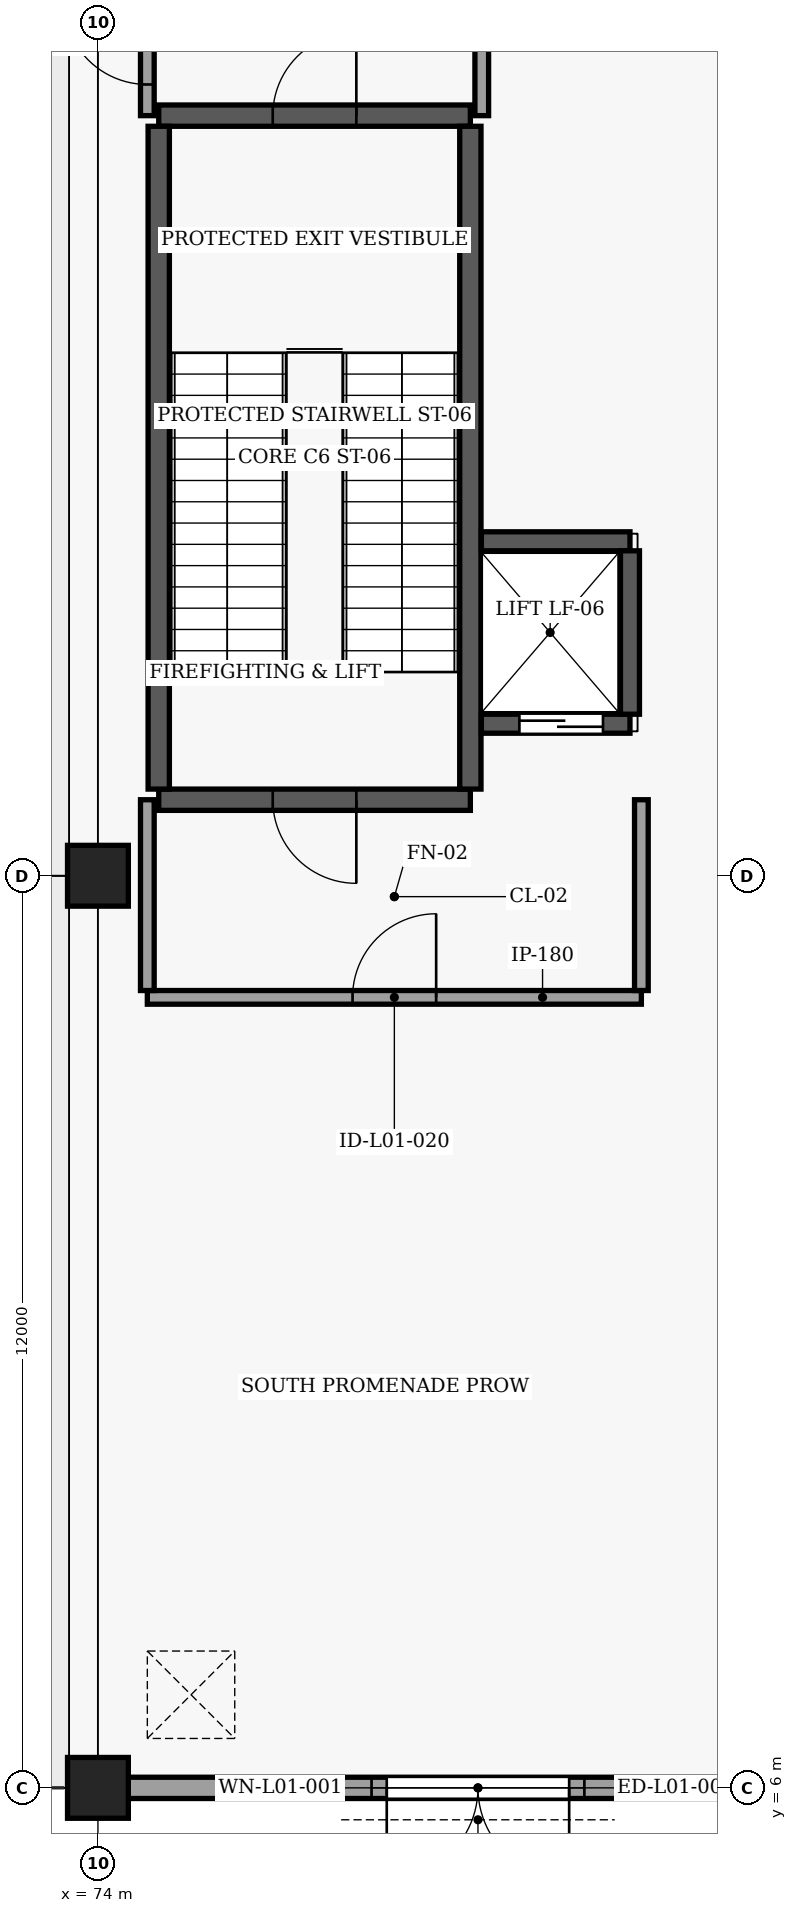
"""IFC4 building model, lengths in metres.
Left out: names, types, materials, properties, quantities, classifications, styles, units other than length and angle.
Written with IfcOpenShell. Run it as: python <this file> out.ifc"""

import sys

from ifc_helpers import new_model, si_unit, direction, frame, frame_2d, origin, origin_2d, place, context, subcontext, project, spatial, rectangle, extrude, element, fill, save


model = new_model("IFC4")
c1 = context("Model", 3, precision=1e-05, world=origin(), true_north=direction((0.0, 1.0)))
c2 = subcontext(c1, "Body", "Model", "MODEL_VIEW")
j1 = project(units=[si_unit("LENGTHUNIT", "METRE"), si_unit("PLANEANGLEUNIT", "RADIAN")], contexts=[c1])
p1 = place(None, origin())
s1 = spatial("IfcSite", under=j1, at=p1, CompositionType="ELEMENT")
p2 = place(p1, origin())
s2 = spatial("IfcBuilding", under=s1, at=p2, CompositionType="ELEMENT")
p3 = place(p2, origin())
s3 = spatial("IfcBuildingStorey", under=s2, at=p3, CompositionType="ELEMENT", Elevation=0.0)
for number, where, z_axis, x_axis in (
    (1, (74.0, 6.0, -0.45), (0.0, 0.0, 1.0), (1.0, 0.0, 0.0)),
    (2, (74.0, 18.0, -0.45), (0.0, 0.0, 1.0), (1.0, 0.0, 0.0)),
):
    element("IfcColumn", number, at=place(p3, frame(where, z_axis=z_axis, x_axis=x_axis)), inside=s3, PredefinedType="COLUMN", context=c2, shape_type="SweptSolid", body=[
        extrude(rectangle(XDim=0.8, YDim=0.8, at=origin_2d()), origin(), (0.0, 0.0, 1.0), 5.57),
    ])
p4 = place(p3, frame((78.9, 19.0, -0.45), z_axis=(0.0, 0.0, 1.0), x_axis=(-1.0, 0.0, 0.0)))
e3 = element("IfcWall", 3, at=p4, inside=s3, PredefinedType="SHEAR", context=c2, shape_type="SweptSolid", body=[
    extrude(rectangle(XDim=4.1, YDim=0.28, at=frame_2d((2.05, 0.0))), origin(), (0.0, 0.0, 1.0), 5.57),
])
p5 = place(p4, frame((1.5, 0.0, 0.45)))
e4 = element("IfcOpeningElement", 4, at=p5, cuts=e3, PredefinedType="OPENING", context=c2, shape_type="SweptSolid", body=[
    extrude(rectangle(XDim=1.1, YDim=2.2, at=frame_2d((0.55, 1.1))), frame((0.0, 0.15, 0.0), z_axis=(0.0, -1.0, 0.0), x_axis=(1.0, 0.0, 0.0)), (0.0, 0.0, 1.0), 0.3),
])
p6 = place(p3, frame((74.8, 28.0, -0.45), z_axis=(0.0, 0.0, 1.0), x_axis=(1.0, 0.0, 0.0)))
e5 = element("IfcWall", 5, at=p6, inside=s3, PredefinedType="SHEAR", context=c2, shape_type="SweptSolid", body=[
    extrude(rectangle(XDim=4.1, YDim=0.28, at=frame_2d((2.05, 0.0))), origin(), (0.0, 0.0, 1.0), 5.57),
])
p7 = place(p6, frame((1.5, 0.0, 0.45)))
e6 = element("IfcOpeningElement", 6, at=p7, cuts=e5, PredefinedType="OPENING", context=c2, shape_type="SweptSolid", body=[
    extrude(rectangle(XDim=1.1, YDim=2.2, at=frame_2d((0.55, 1.1))), frame((0.0, 0.15, 0.0), z_axis=(0.0, -1.0, 0.0), x_axis=(1.0, 0.0, 0.0)), (0.0, 0.0, 1.0), 0.3),
])
for number, where, z_axis, x_axis in (
    (7, (74.8, 19.14, -0.45), (0.0, 0.0, 1.0), (0.0, 1.0, 0.0)),
    (8, (78.9, 19.14, -0.45), (0.0, 0.0, 1.0), (0.0, 1.0, 0.0)),
):
    element("IfcWall", number, at=place(p3, frame(where, z_axis=z_axis, x_axis=x_axis)), inside=s3, PredefinedType="SHEAR", context=c2, shape_type="SweptSolid", body=[
        extrude(rectangle(XDim=8.72, YDim=0.28, at=frame_2d((4.36, 0.0))), origin(), (0.0, 0.0, 1.0), 5.57),
    ])
p8 = place(p3, frame((79.045, 20.0, -1.6), z_axis=(0.0, 0.0, 1.0), x_axis=(1.0, 0.0, 0.0)))
e9 = element("IfcWall", 9, at=p8, inside=s3, PredefinedType="SOLIDWALL", context=c2, shape_type="SweptSolid", body=[
    extrude(rectangle(XDim=1.955, YDim=0.25, at=frame_2d((0.978, 0.0))), origin(), (0.0, 0.0, 1.0), 6.72),
])
p9 = place(p8, frame((0.5, 0.0, 1.6)))
e10 = element("IfcOpeningElement", 10, at=p9, cuts=e9, PredefinedType="OPENING", context=c2, shape_type="SweptSolid", body=[
    extrude(rectangle(XDim=1.1, YDim=2.2, at=frame_2d((0.55, 1.1))), frame((0.0, 0.135, 0.0), z_axis=(0.0, -1.0, 0.0), x_axis=(1.0, 0.0, 0.0)), (0.0, 0.0, 1.0), 0.27),
])
p10 = place(p3, frame((79.045, 22.4, -1.6), z_axis=(0.0, 0.0, 1.0), x_axis=(1.0, 0.0, 0.0)))
e11 = element("IfcWall", 11, at=p10, inside=s3, PredefinedType="SOLIDWALL", context=c2, shape_type="SweptSolid", body=[
    extrude(rectangle(XDim=1.955, YDim=0.25, at=frame_2d((0.978, 0.0))), origin(), (0.0, 0.0, 1.0), 6.72),
])
p11 = place(p3, frame((81.0, 20.125, -1.6), z_axis=(0.0, 0.0, 1.0), x_axis=(0.0, 1.0, 0.0)))
e12 = element("IfcWall", 12, at=p11, inside=s3, PredefinedType="SOLIDWALL", context=c2, shape_type="SweptSolid", body=[
    extrude(rectangle(XDim=2.15, YDim=0.25, at=frame_2d((1.075, 0.0))), origin(), (0.0, 0.0, 1.0), 6.72),
])
p12 = place(p3, frame((83.65, 6.0, 0.0), z_axis=(0.0, 0.0, 1.0), x_axis=(-1.0, 0.0, 0.0)))
e13 = element("IfcWall", 13, at=p12, inside=s3, PredefinedType="SOLIDWALL", context=c2, shape_type="SweptSolid", body=[
    extrude(rectangle(XDim=9.3, YDim=0.28, at=frame_2d((4.65, 0.0))), origin(), (0.0, 0.0, 1.0), 4.658),
])
p13 = place(p12, frame((3.45, 0.0, 0.0)))
e14 = element("IfcOpeningElement", 14, at=p13, cuts=e13, PredefinedType="OPENING", context=c2, shape_type="SweptSolid", body=[
    extrude(rectangle(XDim=2.4, YDim=2.4, at=frame_2d((1.2, 1.2))), frame((0.0, 0.15, 0.0), z_axis=(0.0, -1.0, 0.0), x_axis=(1.0, 0.0, 0.0)), (0.0, 0.0, 1.0), 0.3),
])
p14 = place(p12, frame((3.25, 0.0, 3.1)))
e15 = element("IfcOpeningElement", 15, at=p14, cuts=e13, PredefinedType="OPENING", context=c2, shape_type="SweptSolid", body=[
    extrude(rectangle(XDim=2.8, YDim=0.95, at=frame_2d((1.4, 0.475))), frame((0.0, 0.15, 0.0), z_axis=(0.0, -1.0, 0.0), x_axis=(1.0, 0.0, 0.0)), (0.0, 0.0, 1.0), 0.3),
])
p15 = place(p3, frame((74.65, 16.4, 0.0), z_axis=(0.0, 0.0, 1.0), x_axis=(1.0, 0.0, 0.0)))
e16 = element("IfcWall", 16, at=p15, inside=s3, PredefinedType="SOLIDWALL", context=c2, shape_type="SweptSolid", body=[
    extrude(rectangle(XDim=6.5, YDim=0.18, at=frame_2d((3.25, 0.0))), origin(), (0.0, 0.0, 1.0), 5.1),
])
p16 = place(p15, frame((2.7, 0.0, 0.0)))
e17 = element("IfcOpeningElement", 17, at=p16, cuts=e16, PredefinedType="OPENING", context=c2, shape_type="SweptSolid", body=[
    extrude(rectangle(XDim=1.1, YDim=2.2, at=frame_2d((0.55, 1.1))), frame((0.0, 0.1, 0.0), z_axis=(0.0, -1.0, 0.0), x_axis=(1.0, 0.0, 0.0)), (0.0, 0.0, 1.0), 0.2),
])
for number, where, z_axis, x_axis in (
    (18, (74.65, 16.49, 0.0), (0.0, 0.0, 1.0), (0.0, 1.0, 0.0)),
    (19, (81.15, 16.49, 0.0), (0.0, 0.0, 1.0), (0.0, 1.0, 0.0)),
):
    element("IfcWall", number, at=place(p3, frame(where, z_axis=z_axis, x_axis=x_axis)), inside=s3, PredefinedType="SOLIDWALL", context=c2, shape_type="SweptSolid", body=[
        extrude(rectangle(XDim=2.51, YDim=0.18, at=frame_2d((1.255, 0.0))), origin(), (0.0, 0.0, 1.0), 4.66),
    ])
p17 = place(p3, frame((74.65, 28.0, 0.0), z_axis=(0.0, 0.0, 1.0), x_axis=(0.0, 1.0, 0.0)))
e20 = element("IfcWall", 20, at=p17, inside=s3, PredefinedType="SOLIDWALL", context=c2, shape_type="SweptSolid", body=[
    extrude(rectangle(XDim=1.92, YDim=0.18, at=frame_2d((0.96, 0.0))), origin(), (0.0, 0.0, 1.0), 5.1),
])
p18 = place(p17, frame((0.41, 0.0, 0.0)))
e21 = element("IfcOpeningElement", 21, at=p18, cuts=e20, PredefinedType="OPENING", context=c2, shape_type="SweptSolid", body=[
    extrude(rectangle(XDim=1.1, YDim=2.2, at=frame_2d((0.55, 1.1))), frame((0.0, 0.1, 0.0), z_axis=(0.0, -1.0, 0.0), x_axis=(1.0, 0.0, 0.0)), (0.0, 0.0, 1.0), 0.2),
])
p19 = place(p3, frame((79.05, 28.0, 0.0), z_axis=(0.0, 0.0, 1.0), x_axis=(0.0, 1.0, 0.0)))
e22 = element("IfcWall", 22, at=p19, inside=s3, PredefinedType="SOLIDWALL", context=c2, shape_type="SweptSolid", body=[
    extrude(rectangle(XDim=1.92, YDim=0.18, at=frame_2d((0.96, 0.0))), origin(), (0.0, 0.0, 1.0), 5.1),
])
p20 = place(p5, origin())
e23 = element("IfcDoor", 23, at=p20, inside=s3, OperationType="SINGLE_SWING_LEFT", PredefinedType="DOOR", context=c2, shape_type="SweptSolid", body=[
    extrude(rectangle(XDim=1.1, YDim=2.2, at=frame_2d((0.55, 1.1))), frame((0.0, 0.025, 0.0), z_axis=(0.0, -1.0, 0.0), x_axis=(1.0, 0.0, 0.0)), (0.0, 0.0, 1.0), 0.05),
])
fill(e4, e23)
p21 = place(p7, origin())
e24 = element("IfcDoor", 24, at=p21, inside=s3, OperationType="SINGLE_SWING_RIGHT", PredefinedType="DOOR", context=c2, shape_type="SweptSolid", body=[
    extrude(rectangle(XDim=1.1, YDim=2.2, at=frame_2d((0.55, 1.1))), frame((0.0, 0.025, 0.0), z_axis=(0.0, -1.0, 0.0), x_axis=(1.0, 0.0, 0.0)), (0.0, 0.0, 1.0), 0.05),
])
fill(e6, e24)
p22 = place(p9, origin())
e25 = element("IfcDoor", 25, at=p22, inside=s3, OperationType="SLIDING_TO_LEFT", PredefinedType="DOOR", context=c2, shape_type="SweptSolid", body=[
    extrude(rectangle(XDim=1.1, YDim=2.2, at=frame_2d((0.55, 1.1))), frame((0.0, 0.025, 0.0), z_axis=(0.0, -1.0, 0.0), x_axis=(1.0, 0.0, 0.0)), (0.0, 0.0, 1.0), 0.05),
])
fill(e10, e25)
p23 = place(p13, origin())
e26 = element("IfcDoor", 26, at=p23, inside=s3, OperationType="DOUBLE_DOOR_SINGLE_SWING", PredefinedType="DOOR", context=c2, shape_type="SweptSolid", body=[
    extrude(rectangle(XDim=2.4, YDim=2.4, at=frame_2d((1.2, 1.2))), frame((0.0, 0.025, 0.0), z_axis=(0.0, -1.0, 0.0), x_axis=(1.0, 0.0, 0.0)), (0.0, 0.0, 1.0), 0.05),
])
fill(e14, e26)
p24 = place(p14, origin())
e27 = element("IfcWindow", 27, at=p24, inside=s3, PartitioningType="SINGLE_PANEL", PredefinedType="WINDOW", context=c2, shape_type="SweptSolid", body=[
    extrude(rectangle(XDim=2.8, YDim=0.95, at=frame_2d((1.4, 0.475))), frame((0.0, 0.03, 0.0), z_axis=(0.0, -1.0, 0.0), x_axis=(1.0, 0.0, 0.0)), (0.0, 0.0, 1.0), 0.06),
])
fill(e15, e27)
p25 = place(p16, origin())
e28 = element("IfcDoor", 28, at=p25, inside=s3, OperationType="SINGLE_SWING_RIGHT", PredefinedType="DOOR", context=c2, shape_type="SweptSolid", body=[
    extrude(rectangle(XDim=1.1, YDim=2.2, at=frame_2d((0.55, 1.1))), frame((0.0, 0.025, 0.0), z_axis=(0.0, -1.0, 0.0), x_axis=(1.0, 0.0, 0.0)), (0.0, 0.0, 1.0), 0.05),
])
fill(e17, e28)
p26 = place(p18, origin())
e29 = element("IfcDoor", 29, at=p26, inside=s3, OperationType="SINGLE_SWING_RIGHT", PredefinedType="DOOR", context=c2, shape_type="SweptSolid", body=[
    extrude(rectangle(XDim=1.1, YDim=2.2, at=frame_2d((0.55, 1.1))), frame((0.0, 0.025, 0.0), z_axis=(0.0, -1.0, 0.0), x_axis=(1.0, 0.0, 0.0)), (0.0, 0.0, 1.0), 0.05),
])
fill(e21, e29)
save(model, sys.argv[1])
